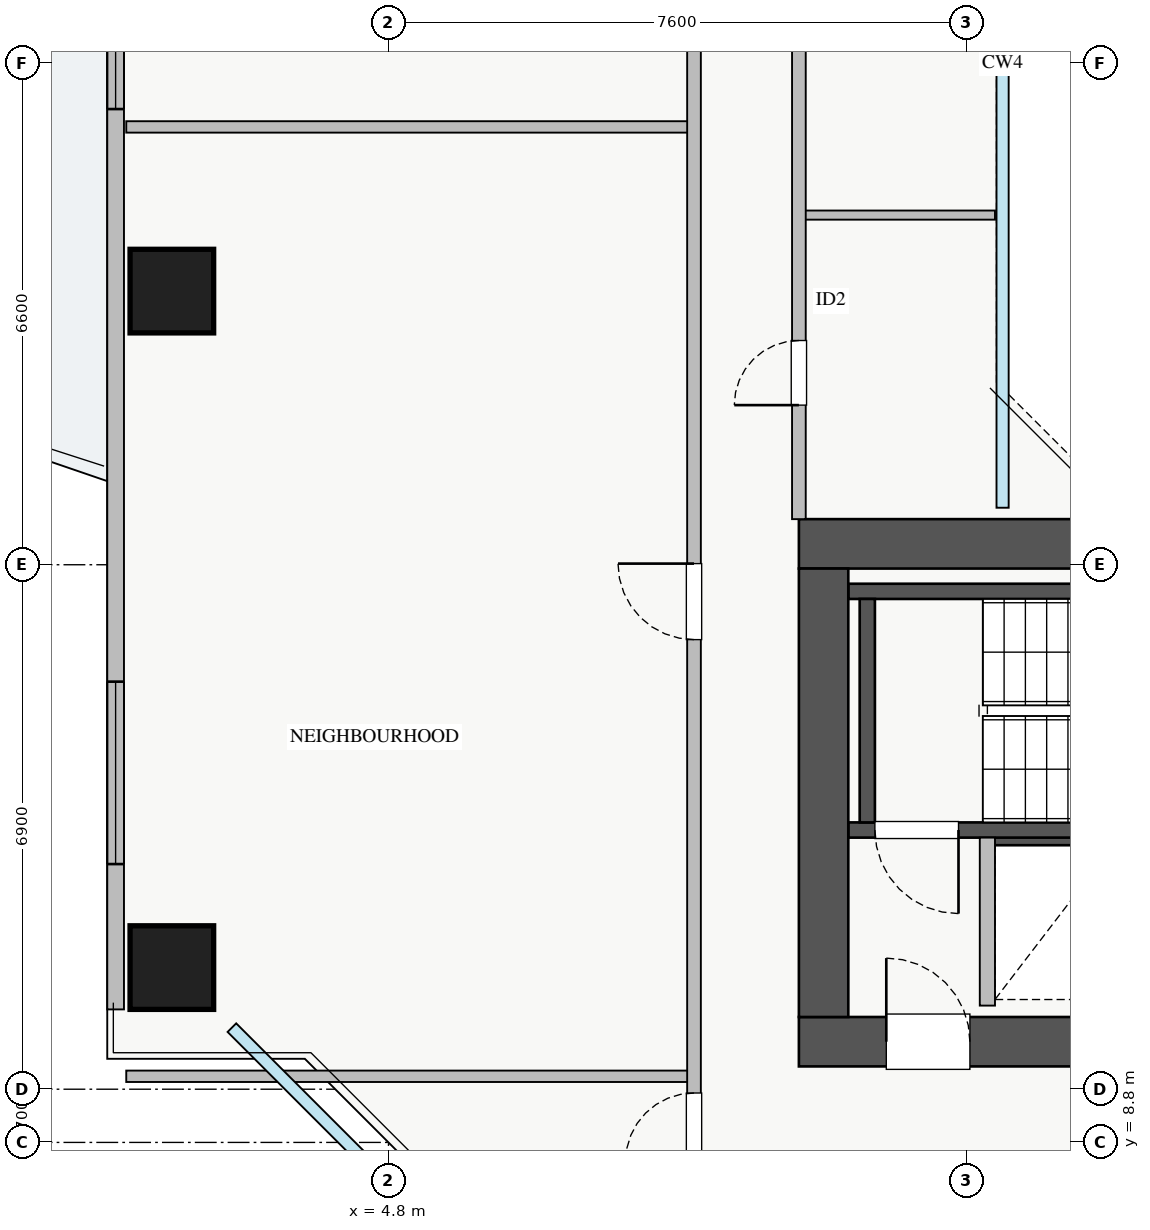
"""IFC4 building model, lengths in metres.
Left out: names, types, materials, properties, quantities, classifications, styles, units other than length and angle.
Written with IfcOpenShell. Run it as: python <this file> out.ifc"""

import sys

from ifc_helpers import new_model, si_unit, direction, frame, frame_2d, origin, origin_2d, place, context, subcontext, project, spatial, rectangle, extrude, source, transform, mapped, element, fill, save


model = new_model("IFC4")
c1 = context("Model", 3, precision=1e-05, world=origin(), true_north=direction((0.0, 1.0)))
c2 = subcontext(c1, "Body", "Model", "MODEL_VIEW")
j1 = project(units=[si_unit("LENGTHUNIT", "METRE"), si_unit("PLANEANGLEUNIT", "RADIAN")], contexts=[c1])
p1 = place(None, origin())
s1 = spatial("IfcSite", under=j1, at=p1, CompositionType="ELEMENT")
p2 = place(p1, origin())
s2 = spatial("IfcBuilding", under=s1, at=p2, CompositionType="ELEMENT")
p3 = place(p2, frame((0.0, 0.0, 132.75)))
s3 = spatial("IfcBuildingStorey", under=s2, at=p3, CompositionType="ELEMENT", Elevation=132.75)
p4 = place(p3, frame((12.68, 12.8, 0.0), z_axis=(0.0, 0.0, 1.0), x_axis=(1.0, 0.0, 0.0)))
e1 = element("IfcWall", 1, at=p4, inside=s3, PredefinedType="SHEAR", context=c2, shape_type="SweptSolid", body=[
    extrude(rectangle(XDim=1.94, YDim=0.18, at=frame_2d((0.97, 0.0))), origin(), (0.0, 0.0, 1.0), 3.07),
])
p5 = place(p3, frame((10.85, 12.91, 0.0), z_axis=(0.0, 0.0, 1.0), x_axis=(1.0, 0.0, 0.0)))
e2 = element("IfcWall", 2, at=p5, inside=s3, PredefinedType="SHEAR", context=c2, shape_type="SweptSolid", body=[
    extrude(rectangle(XDim=7.3, YDim=0.2, at=frame_2d((3.65, 0.0))), origin(), (0.0, 0.0, 1.0), 3.25),
])
p6 = place(p5, frame((0.35, 0.0, 0.0)))
e3 = element("IfcOpeningElement", 3, at=p6, cuts=e2, PredefinedType="OPENING", context=c2, shape_type="SweptSolid", body=[
    extrude(rectangle(XDim=1.1, YDim=2.05, at=frame_2d((0.55, 1.025))), frame((0.0, 0.11, 0.0), z_axis=(0.0, -1.0, 0.0), x_axis=(1.0, 0.0, 0.0)), (0.0, 0.0, 1.0), 0.22),
])
p7 = place(p3, frame((10.85, 16.05, 0.0), z_axis=(0.0, 0.0, 1.0), x_axis=(1.0, 0.0, 0.0)))
e4 = element("IfcWall", 4, at=p7, inside=s3, PredefinedType="SHEAR", context=c2, shape_type="SweptSolid", body=[
    extrude(rectangle(XDim=7.3, YDim=0.2, at=frame_2d((3.65, 0.0))), origin(), (0.0, 0.0, 1.0), 3.25),
])
p8 = place(p3, frame((11.1, 13.01, 0.0), z_axis=(0.0, 0.0, 1.0), x_axis=(0.0, 1.0, 0.0)))
e5 = element("IfcWall", 5, at=p8, inside=s3, PredefinedType="SHEAR", context=c2, shape_type="SweptSolid", body=[
    extrude(rectangle(XDim=2.94, YDim=0.2, at=frame_2d((1.47, 0.0))), origin(), (0.0, 0.0, 1.0), 3.25),
])
p9 = place(p3, frame((10.2, 10.125, 0.0), z_axis=(0.0, 0.0, 1.0), x_axis=(1.0, 0.0, 0.0)))
e6 = element("IfcWall", 6, at=p9, inside=s3, PredefinedType="SHEAR", context=c2, shape_type="SweptSolid", body=[
    extrude(rectangle(XDim=17.6, YDim=0.65, at=frame_2d((8.8, 0.0))), origin(), (0.0, 0.0, 1.0), 3.25),
])
p10 = place(p9, frame((1.15, 0.0, 0.0)))
e7 = element("IfcOpeningElement", 7, at=p10, cuts=e6, PredefinedType="OPENING", context=c2, shape_type="SweptSolid", body=[
    extrude(rectangle(XDim=1.1, YDim=2.05, at=frame_2d((0.55, 1.025))), frame((0.0, 0.335, 0.0), z_axis=(0.0, -1.0, 0.0), x_axis=(1.0, 0.0, 0.0)), (0.0, 0.0, 1.0), 0.67),
])
p11 = place(p9, frame((8.3, 0.0, 0.0)))
e8 = element("IfcOpeningElement", 8, at=p11, cuts=e6, PredefinedType="OPENING", context=c2, shape_type="SweptSolid", body=[
    extrude(rectangle(XDim=1.1, YDim=2.05, at=frame_2d((0.55, 1.025))), frame((0.0, 0.335, 0.0), z_axis=(0.0, -1.0, 0.0), x_axis=(1.0, 0.0, 0.0)), (0.0, 0.0, 1.0), 0.67),
])
p12 = place(p9, frame((4.9, 0.0, 0.0)))
e9 = element("IfcOpeningElement", 9, at=p12, cuts=e6, PredefinedType="OPENING", context=c2, shape_type="SweptSolid", body=[
    extrude(rectangle(XDim=1.1, YDim=2.05, at=frame_2d((0.55, 1.025))), frame((0.0, 0.335, 0.0), z_axis=(0.0, -1.0, 0.0), x_axis=(1.0, 0.0, 0.0)), (0.0, 0.0, 1.0), 0.67),
])
p13 = place(p9, frame((14.74, 0.0, 0.0)))
e10 = element("IfcOpeningElement", 10, at=p13, cuts=e6, PredefinedType="OPENING", context=c2, shape_type="SweptSolid", body=[
    extrude(rectangle(XDim=1.0, YDim=2.05, at=frame_2d((0.5, 1.025))), frame((0.0, 0.335, 0.0), z_axis=(0.0, -1.0, 0.0), x_axis=(1.0, 0.0, 0.0)), (0.0, 0.0, 1.0), 0.67),
])
p14 = place(p9, frame((10.155, 0.0, 0.0)))
e11 = element("IfcOpeningElement", 11, at=p14, cuts=e6, PredefinedType="OPENING", context=c2, shape_type="SweptSolid", body=[
    extrude(rectangle(XDim=1.0, YDim=2.05, at=frame_2d((0.5, 1.025))), frame((0.0, 0.335, 0.0), z_axis=(0.0, -1.0, 0.0), x_axis=(1.0, 0.0, 0.0)), (0.0, 0.0, 1.0), 0.67),
])
p15 = place(p9, frame((11.87, 0.0, 0.0)))
e12 = element("IfcOpeningElement", 12, at=p15, cuts=e6, PredefinedType="OPENING", context=c2, shape_type="SweptSolid", body=[
    extrude(rectangle(XDim=1.0, YDim=2.05, at=frame_2d((0.5, 1.025))), frame((0.0, 0.335, 0.0), z_axis=(0.0, -1.0, 0.0), x_axis=(1.0, 0.0, 0.0)), (0.0, 0.0, 1.0), 0.67),
])
p16 = place(p9, frame((13.46, 0.0, 0.0)))
e13 = element("IfcOpeningElement", 13, at=p16, cuts=e6, PredefinedType="OPENING", context=c2, shape_type="SweptSolid", body=[
    extrude(rectangle(XDim=1.0, YDim=2.05, at=frame_2d((0.5, 1.025))), frame((0.0, 0.335, 0.0), z_axis=(0.0, -1.0, 0.0), x_axis=(1.0, 0.0, 0.0)), (0.0, 0.0, 1.0), 0.67),
])
p17 = place(p3, frame((10.2, 16.675, 0.0), z_axis=(0.0, 0.0, 1.0), x_axis=(1.0, 0.0, 0.0)))
e14 = element("IfcWall", 14, at=p17, inside=s3, PredefinedType="SHEAR", context=c2, shape_type="SweptSolid", body=[
    extrude(rectangle(XDim=17.6, YDim=0.65, at=frame_2d((8.8, 0.0))), origin(), (0.0, 0.0, 1.0), 3.25),
])
p18 = place(p3, frame((10.525, 10.45, 0.0), z_axis=(0.0, 0.0, 1.0), x_axis=(0.0, 1.0, 0.0)))
e15 = element("IfcWall", 15, at=p18, inside=s3, PredefinedType="SHEAR", context=c2, shape_type="SweptSolid", body=[
    extrude(rectangle(XDim=5.9, YDim=0.65, at=frame_2d((2.95, 0.0))), origin(), (0.0, 0.0, 1.0), 3.25),
])
m1 = source(origin(), c2, "Body", "SweptSolid", [
    extrude(rectangle(XDim=1.1, YDim=1.1, at=origin_2d()), origin(), (0.0, 0.0, 1.0), 3.25),
])
for number, where, z_axis, x_axis in (
    (16, (1.95, 20.0, 0.0), (0.0, 0.0, 1.0), (1.0, 0.0, 0.0)),
    (17, (1.95, 11.1, 0.0), (0.0, 0.0, 1.0), (1.0, 0.0, 0.0)),
):
    element("IfcColumn", number, at=place(p3, frame(where, z_axis=z_axis, x_axis=x_axis)), inside=s3, PredefinedType="COLUMN", context=c2, shape_type="MappedRepresentation", body=[
        mapped(m1, transform((0.0, 0.0, 0.0), x_axis=(1.0, 0.0, 0.0), y_axis=(0.0, 1.0, 0.0), z_axis=(0.0, 0.0, 1.0), scale=1.0)),
    ])
p19 = place(p3, frame((1.21, 10.55, 0.0), z_axis=(0.0, 0.0, 1.0), x_axis=(0.0, 1.0, 0.0)))
e18 = element("IfcWall", 18, at=p19, inside=s3, PredefinedType="STANDARD", context=c2, shape_type="SweptSolid", body=[
    extrude(rectangle(XDim=24.9, YDim=0.22, at=frame_2d((12.45, 0.0))), origin(), (0.0, 0.0, 1.0), 2.61),
])
p20 = place(p19, frame((13.3, 0.0, 0.0)))
e19 = element("IfcOpeningElement", 19, at=p20, cuts=e18, PredefinedType="OPENING", context=c2, shape_type="SweptSolid", body=[
    extrude(rectangle(XDim=1.2, YDim=2.1, at=frame_2d((0.6, 1.05))), frame((0.0, 0.12, 0.0), z_axis=(0.0, -1.0, 0.0), x_axis=(1.0, 0.0, 0.0)), (0.0, 0.0, 1.0), 0.24),
])
p21 = place(p19, frame((1.912, 0.0, 0.9)))
e20 = element("IfcOpeningElement", 20, at=p21, cuts=e18, PredefinedType="OPENING", context=c2, shape_type="SweptSolid", body=[
    extrude(rectangle(XDim=2.4, YDim=1.48, at=frame_2d((1.2, 0.74))), frame((0.0, 0.12, 0.0), z_axis=(0.0, -1.0, 0.0), x_axis=(1.0, 0.0, 0.0)), (0.0, 0.0, 1.0), 0.24),
])
p22 = place(p19, frame((20.737, 0.0, 0.9)))
e21 = element("IfcOpeningElement", 21, at=p22, cuts=e18, PredefinedType="OPENING", context=c2, shape_type="SweptSolid", body=[
    extrude(rectangle(XDim=2.1, YDim=1.48, at=frame_2d((1.05, 0.74))), frame((0.0, 0.12, 0.0), z_axis=(0.0, -1.0, 0.0), x_axis=(1.0, 0.0, 0.0)), (0.0, 0.0, 1.0), 0.24),
])
p23 = place(p19, frame((11.845, 0.0, 0.9)))
e22 = element("IfcOpeningElement", 22, at=p23, cuts=e18, PredefinedType="OPENING", context=c2, shape_type="SweptSolid", body=[
    extrude(rectangle(XDim=0.9, YDim=1.2, at=frame_2d((0.45, 0.6))), frame((0.0, 0.12, 0.0), z_axis=(0.0, -1.0, 0.0), x_axis=(1.0, 0.0, 0.0)), (0.0, 0.0, 1.0), 0.24),
])
p24 = place(p3, frame((12.68, 10.6, 0.0), z_axis=(0.0, 0.0, 1.0), x_axis=(0.0, 1.0, 0.0)))
e23 = element("IfcWall", 23, at=p24, inside=s3, PredefinedType="PARTITIONING", context=c2, shape_type="SweptSolid", body=[
    extrude(rectangle(XDim=2.21, YDim=0.2, at=frame_2d((1.105, 0.0))), origin(), (0.0, 0.0, 1.0), 3.07),
])
for number, where, z_axis, x_axis in (
    (24, (1.35, 9.67, 0.0), (0.0, 0.0, 1.0), (1.0, 0.0, 0.0)),
    (25, (1.35, 22.16, 0.0), (0.0, 0.0, 1.0), (1.0, 0.0, 0.0)),
):
    element("IfcWall", number, at=place(p3, frame(where, z_axis=z_axis, x_axis=x_axis)), inside=s3, PredefinedType="PARTITIONING", context=c2, shape_type="SweptSolid", body=[
        extrude(rectangle(XDim=7.47, YDim=0.15, at=frame_2d((3.735, 0.0))), origin(), (0.0, 0.0, 1.0), 3.07),
    ])
p25 = place(p3, frame((8.82, 8.31, 0.0), z_axis=(0.0, 0.0, 1.0), x_axis=(0.0, 1.0, 0.0)))
e26 = element("IfcWall", 26, at=p25, inside=s3, PredefinedType="PARTITIONING", context=c2, shape_type="SweptSolid", body=[
    extrude(rectangle(XDim=29.13, YDim=0.18, at=frame_2d((14.565, 0.0))), origin(), (0.0, 0.0, 1.0), 3.07),
])
p26 = place(p25, frame((27.94, 0.0, 0.0)))
e27 = element("IfcOpeningElement", 27, at=p26, cuts=e26, PredefinedType="OPENING", context=c2, shape_type="SweptSolid", body=[
    extrude(rectangle(XDim=0.9, YDim=2.05, at=frame_2d((0.45, 1.025))), frame((0.0, 0.1, 0.0), z_axis=(0.0, -1.0, 0.0), x_axis=(1.0, 0.0, 0.0)), (0.0, 0.0, 1.0), 0.2),
])
p27 = place(p25, frame((0.24, 0.0, 0.0)))
e28 = element("IfcOpeningElement", 28, at=p27, cuts=e26, PredefinedType="OPENING", context=c2, shape_type="SweptSolid", body=[
    extrude(rectangle(XDim=0.9, YDim=2.05, at=frame_2d((0.45, 1.025))), frame((0.0, 0.1, 0.0), z_axis=(0.0, -1.0, 0.0), x_axis=(1.0, 0.0, 0.0)), (0.0, 0.0, 1.0), 0.2),
])
p28 = place(p25, frame((7.105, 0.0, 0.0)))
e29 = element("IfcOpeningElement", 29, at=p28, cuts=e26, PredefinedType="OPENING", context=c2, shape_type="SweptSolid", body=[
    extrude(rectangle(XDim=1.0, YDim=2.05, at=frame_2d((0.5, 1.025))), frame((0.0, 0.1, 0.0), z_axis=(0.0, -1.0, 0.0), x_axis=(1.0, 0.0, 0.0)), (0.0, 0.0, 1.0), 0.2),
])
p29 = place(p25, frame((16.475, 0.0, 0.0)))
e30 = element("IfcOpeningElement", 30, at=p29, cuts=e26, PredefinedType="OPENING", context=c2, shape_type="SweptSolid", body=[
    extrude(rectangle(XDim=1.0, YDim=2.05, at=frame_2d((0.5, 1.025))), frame((0.0, 0.1, 0.0), z_axis=(0.0, -1.0, 0.0), x_axis=(1.0, 0.0, 0.0)), (0.0, 0.0, 1.0), 0.2),
])
p30 = place(p3, frame((10.2, 21.0, 0.0), z_axis=(0.0, 0.0, 1.0), x_axis=(1.0, 0.0, 0.0)))
e31 = element("IfcWall", 31, at=p30, inside=s3, PredefinedType="PLUMBINGWALL", context=c2, shape_type="SweptSolid", body=[
    extrude(rectangle(XDim=2.58, YDim=0.12, at=frame_2d((1.29, 0.0))), origin(), (0.0, 0.0, 1.0), 3.07),
])
p31 = place(p3, frame((10.2, 17.0, 0.0), z_axis=(0.0, 0.0, 1.0), x_axis=(0.0, 1.0, 0.0)))
e32 = element("IfcWall", 32, at=p31, inside=s3, PredefinedType="PARTITIONING", context=c2, shape_type="SweptSolid", body=[
    extrude(rectangle(XDim=12.0, YDim=0.18, at=frame_2d((6.0, 0.0))), origin(), (0.0, 0.0, 1.0), 3.07),
])
p32 = place(p31, frame((1.5, 0.0, 0.0)))
e33 = element("IfcOpeningElement", 33, at=p32, cuts=e32, PredefinedType="OPENING", context=c2, shape_type="SweptSolid", body=[
    extrude(rectangle(XDim=0.85, YDim=2.05, at=frame_2d((0.425, 1.025))), frame((0.0, 0.1, 0.0), z_axis=(0.0, -1.0, 0.0), x_axis=(1.0, 0.0, 0.0)), (0.0, 0.0, 1.0), 0.2),
])
p33 = place(p31, frame((6.5, 0.0, 0.0)))
e34 = element("IfcOpeningElement", 34, at=p33, cuts=e32, PredefinedType="OPENING", context=c2, shape_type="SweptSolid", body=[
    extrude(rectangle(XDim=1.0, YDim=2.05, at=frame_2d((0.5, 1.025))), frame((0.0, 0.1, 0.0), z_axis=(0.0, -1.0, 0.0), x_axis=(1.0, 0.0, 0.0)), (0.0, 0.0, 1.0), 0.2),
])
m2 = source(origin(), c2, "Body", "SweptSolid", [
    extrude(rectangle(XDim=2.4, YDim=1.48, at=frame_2d((1.2, 0.74))), frame((0.0, 0.03, 0.0), z_axis=(0.0, -1.0, 0.0), x_axis=(1.0, 0.0, 0.0)), (0.0, 0.0, 1.0), 0.06),
])
p34 = place(p21, origin())
e35 = element("IfcWindow", 35, at=p34, inside=s3, PartitioningType="TRIPLE_PANEL_VERTICAL", PredefinedType="WINDOW", context=c2, shape_type="MappedRepresentation", body=[
    mapped(m2, transform((0.0, 0.0, 0.0), x_axis=(1.0, 0.0, 0.0), y_axis=(0.0, 1.0, 0.0), z_axis=(0.0, 0.0, 1.0), scale=1.0)),
])
fill(e20, e35)
m3 = source(origin(), c2, "Body", "SweptSolid", [
    extrude(rectangle(XDim=1.1, YDim=2.05, at=frame_2d((0.55, 1.025))), frame((0.0, 0.025, 0.0), z_axis=(0.0, -1.0, 0.0), x_axis=(1.0, 0.0, 0.0)), (0.0, 0.0, 1.0), 0.05),
])
p35 = place(p10, origin())
e36 = element("IfcDoor", 36, at=p35, inside=s3, OperationType="SINGLE_SWING_LEFT", PredefinedType="DOOR", context=c2, shape_type="MappedRepresentation", body=[
    mapped(m3, transform((0.0, 0.0, 0.0), x_axis=(1.0, 0.0, 0.0), y_axis=(0.0, 1.0, 0.0), z_axis=(0.0, 0.0, 1.0), scale=1.0)),
])
fill(e7, e36)
p36 = place(p6, frame((1.1, 0.0, 0.0), z_axis=(0.0, 0.0, 1.0), x_axis=(-1.0, 0.0, 0.0)))
e37 = element("IfcDoor", 37, at=p36, inside=s3, OperationType="SINGLE_SWING_RIGHT", PredefinedType="DOOR", context=c2, shape_type="MappedRepresentation", body=[
    mapped(m3, transform((0.0, 0.0, 0.0), x_axis=(1.0, 0.0, 0.0), y_axis=(0.0, 1.0, 0.0), z_axis=(0.0, 0.0, 1.0), scale=1.0)),
])
fill(e3, e37)
m4 = source(origin(), c2, "Body", "SweptSolid", [
    extrude(rectangle(XDim=0.9, YDim=2.05, at=frame_2d((0.45, 1.025))), frame((0.0, 0.025, 0.0), z_axis=(0.0, -1.0, 0.0), x_axis=(1.0, 0.0, 0.0)), (0.0, 0.0, 1.0), 0.05),
])
p37 = place(p27, origin())
e38 = element("IfcDoor", 38, at=p37, inside=s3, OperationType="SINGLE_SWING_LEFT", PredefinedType="DOOR", context=c2, shape_type="MappedRepresentation", body=[
    mapped(m4, transform((0.0, 0.0, 0.0), x_axis=(1.0, 0.0, 0.0), y_axis=(0.0, 1.0, 0.0), z_axis=(0.0, 0.0, 1.0), scale=1.0)),
])
fill(e28, e38)
m5 = source(origin(), c2, "Body", "SweptSolid", [
    extrude(rectangle(XDim=1.0, YDim=2.05, at=frame_2d((0.5, 1.025))), frame((0.0, 0.025, 0.0), z_axis=(0.0, -1.0, 0.0), x_axis=(1.0, 0.0, 0.0)), (0.0, 0.0, 1.0), 0.05),
])
p38 = place(p28, origin())
e39 = element("IfcDoor", 39, at=p38, inside=s3, OperationType="SINGLE_SWING_RIGHT", PredefinedType="DOOR", context=c2, shape_type="MappedRepresentation", body=[
    mapped(m5, transform((0.0, 0.0, 0.0), x_axis=(1.0, 0.0, 0.0), y_axis=(0.0, 1.0, 0.0), z_axis=(0.0, 0.0, 1.0), scale=1.0)),
])
fill(e29, e39)
m6 = source(origin(), c2, "Body", "SweptSolid", [
    extrude(rectangle(XDim=0.85, YDim=2.05, at=frame_2d((0.425, 1.025))), frame((0.0, 0.025, 0.0), z_axis=(0.0, -1.0, 0.0), x_axis=(1.0, 0.0, 0.0)), (0.0, 0.0, 1.0), 0.05),
])
p39 = place(p32, origin())
e40 = element("IfcDoor", 40, at=p39, inside=s3, OperationType="SINGLE_SWING_LEFT", PredefinedType="DOOR", context=c2, shape_type="MappedRepresentation", body=[
    mapped(m6, transform((0.0, 0.0, 0.0), x_axis=(1.0, 0.0, 0.0), y_axis=(0.0, 1.0, 0.0), z_axis=(0.0, 0.0, 1.0), scale=1.0)),
])
fill(e33, e40)
m7 = source(origin(), c2, "Body", "SweptSolid", [
    extrude(rectangle(XDim=0.9, YDim=1.2, at=frame_2d((0.45, 0.6))), frame((0.0, 0.03, 0.0), z_axis=(0.0, -1.0, 0.0), x_axis=(1.0, 0.0, 0.0)), (0.0, 0.0, 1.0), 0.06),
])
p40 = place(p23, origin())
e41 = element("IfcWindow", 41, at=p40, inside=s3, PartitioningType="SINGLE_PANEL", PredefinedType="WINDOW", context=c2, shape_type="MappedRepresentation", body=[
    mapped(m7, transform((0.0, 0.0, 0.0), x_axis=(1.0, 0.0, 0.0), y_axis=(0.0, 1.0, 0.0), z_axis=(0.0, 0.0, 1.0), scale=1.0)),
])
fill(e22, e41)
save(model, sys.argv[1])
